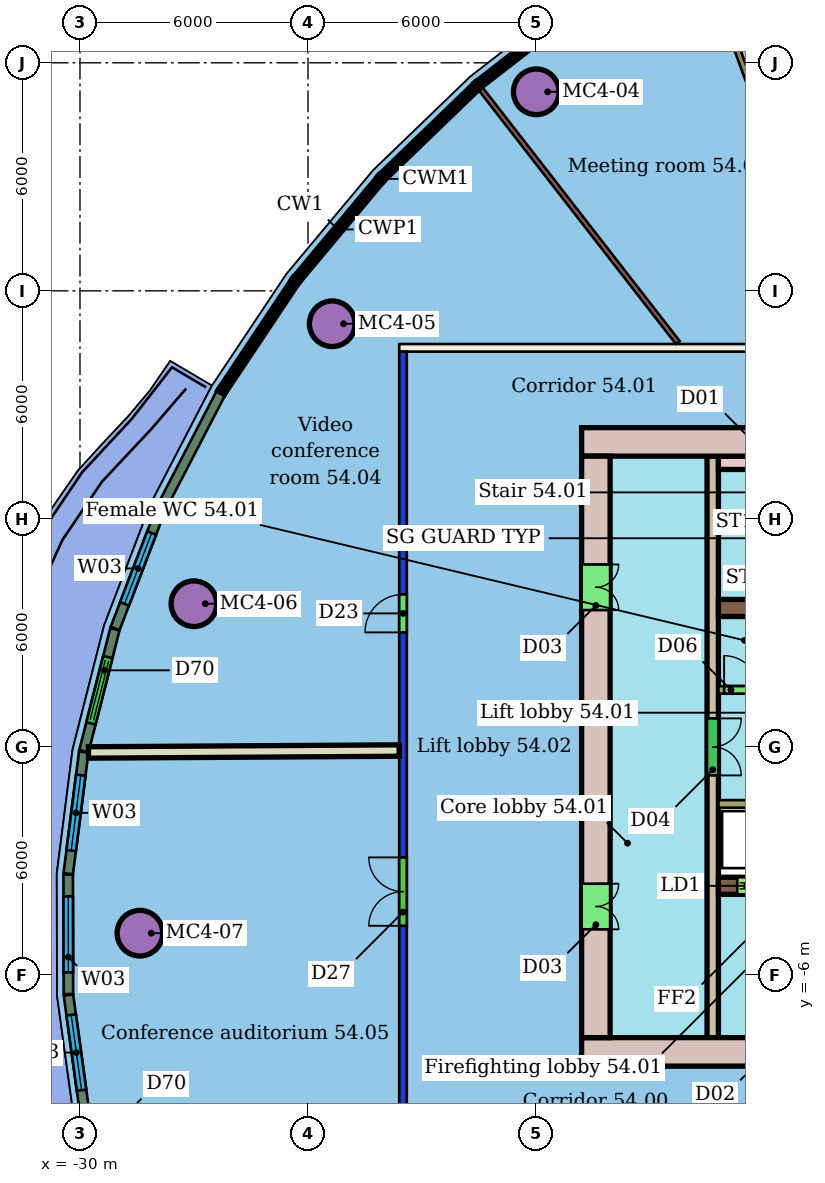
"""IFC4 building model, lengths in metres.
Left out: names, types, materials, properties, quantities, classifications, styles, units other than length and angle.
Written with IfcOpenShell. Run it as: python <this file> out.ifc"""

import sys

from ifc_helpers import new_model, si_unit, direction, frame, frame_2d, origin, origin_2d, place, context, subcontext, project, spatial, rectangle, hollow_circle, extrude, element, fill, save


model = new_model("IFC4")
c1 = context("Model", 3, precision=1e-05, world=origin(), true_north=direction((0.0, 1.0)))
c2 = subcontext(c1, "Body", "Model", "MODEL_VIEW")
j1 = project(units=[si_unit("LENGTHUNIT", "METRE"), si_unit("PLANEANGLEUNIT", "RADIAN")], contexts=[c1])
p1 = place(None, origin())
s1 = spatial("IfcSite", under=j1, at=p1, CompositionType="ELEMENT")
p2 = place(p1, origin())
s2 = spatial("IfcBuilding", under=s1, at=p2, CompositionType="ELEMENT")
p3 = place(p2, frame((0.0, 0.0, 220.9)))
s3 = spatial("IfcBuildingStorey", under=s2, at=p3, CompositionType="ELEMENT", Elevation=220.9)
for number, where, z_axis, x_axis in (
    (1, (-17.993, 17.237, 0.0), (0.0, 0.0, 1.0), (1.0, 0.0, 0.0)),
    (2, (-23.363, 11.134, 0.0), (0.0, 0.0, 1.0), (1.0, 0.0, 0.0)),
    (3, (-27.003, 3.768, 0.0), (0.0, 0.0, 1.0), (1.0, 0.0, 0.0)),
    (4, (-28.424, -4.901, 0.0), (0.0, 0.0, 1.0), (1.0, 0.0, 0.0)),
):
    element("IfcColumn", number, at=place(p3, frame(where, z_axis=z_axis, x_axis=x_axis)), inside=s3, PredefinedType="COLUMN", context=c2, shape_type="SweptSolid", body=[
        extrude(hollow_circle(Radius=0.6, WallThickness=0.045, at=origin_2d()), origin(), (0.0, 0.0, 1.0), 3.45),
    ])
p4 = place(p3, frame((-21.5, -10.4, 0.0), z_axis=(0.0, 0.0, 1.0), x_axis=(0.0, 1.0, 0.0)))
e5 = element("IfcWall", 5, at=p4, inside=s3, PredefinedType="PARTITIONING", context=c2, shape_type="SweptSolid", body=[
    extrude(rectangle(XDim=20.8, YDim=0.2, at=frame_2d((10.4, 0.0))), origin(), (0.0, 0.0, 1.0), 3.05),
])
p5 = place(p4, frame((13.413, 0.0, 0.0)))
e6 = element("IfcOpeningElement", 6, at=p5, cuts=e5, PredefinedType="OPENING", context=c2, shape_type="SweptSolid", body=[
    extrude(rectangle(XDim=1.0, YDim=2.4, at=frame_2d((0.5, 1.2))), frame((0.0, 0.11, 0.0), z_axis=(0.0, -1.0, 0.0), x_axis=(1.0, 0.0, 0.0)), (0.0, 0.0, 1.0), 0.22),
])
p6 = place(p4, frame((5.693, 0.0, 0.0)))
e7 = element("IfcOpeningElement", 7, at=p6, cuts=e5, PredefinedType="OPENING", context=c2, shape_type="SweptSolid", body=[
    extrude(rectangle(XDim=1.8, YDim=2.4, at=frame_2d((0.9, 1.2))), frame((0.0, 0.11, 0.0), z_axis=(0.0, -1.0, 0.0), x_axis=(1.0, 0.0, 0.0)), (0.0, 0.0, 1.0), 0.22),
])
p7 = place(p3, frame((-21.6, 10.5, 0.0), z_axis=(0.0, 0.0, 1.0), x_axis=(1.0, 0.0, 0.0)))
e8 = element("IfcWall", 8, at=p7, inside=s3, PredefinedType="PARTITIONING", context=c2, shape_type="SweptSolid", body=[
    extrude(rectangle(XDim=31.2, YDim=0.2, at=frame_2d((15.6, 0.0))), origin(), (0.0, 0.0, 1.0), 3.45),
])
p8 = place(p7, frame((20.509, 0.0, 0.0)))
e9 = element("IfcOpeningElement", 9, at=p8, cuts=e8, PredefinedType="OPENING", context=c2, shape_type="SweptSolid", body=[
    extrude(rectangle(XDim=1.0, YDim=2.4, at=frame_2d((0.5, 1.2))), frame((0.0, 0.11, 0.0), z_axis=(0.0, -1.0, 0.0), x_axis=(1.0, 0.0, 0.0)), (0.0, 0.0, 1.0), 0.22),
])
p9 = place(p7, frame((13.001, 0.0, 0.0)))
e10 = element("IfcOpeningElement", 10, at=p9, cuts=e8, PredefinedType="OPENING", context=c2, shape_type="SweptSolid", body=[
    extrude(rectangle(XDim=0.9, YDim=2.1, at=frame_2d((0.45, 1.05))), frame((0.0, 0.11, 0.0), z_axis=(0.0, -1.0, 0.0), x_axis=(1.0, 0.0, 0.0)), (0.0, 0.0, 1.0), 0.22),
])
p10 = place(p7, frame((9.617, 0.0, 0.0)))
e11 = element("IfcOpeningElement", 11, at=p10, cuts=e8, PredefinedType="OPENING", context=c2, shape_type="SweptSolid", body=[
    extrude(rectangle(XDim=0.9, YDim=2.1, at=frame_2d((0.45, 1.05))), frame((0.0, 0.11, 0.0), z_axis=(0.0, -1.0, 0.0), x_axis=(1.0, 0.0, 0.0)), (0.0, 0.0, 1.0), 0.22),
])
p11 = place(p7, frame((25.646, 0.0, 0.0)))
e12 = element("IfcOpeningElement", 12, at=p11, cuts=e8, PredefinedType="OPENING", context=c2, shape_type="SweptSolid", body=[
    extrude(rectangle(XDim=1.2, YDim=2.4, at=frame_2d((0.6, 1.2))), frame((0.0, 0.11, 0.0), z_axis=(0.0, -1.0, 0.0), x_axis=(1.0, 0.0, 0.0)), (0.0, 0.0, 1.0), 0.22),
])
p12 = place(p3, frame((-13.765, 21.249, 0.0), z_axis=(0.0, 0.0, 1.0), x_axis=(0.34323140515, -0.939250873046, 0.0)))
e13 = element("IfcWall", 13, at=p12, inside=s3, PredefinedType="PARTITIONING", context=c2, shape_type="SweptSolid", body=[
    extrude(rectangle(XDim=11.31, YDim=0.15, at=frame_2d((5.655, 0.0))), origin(), (0.0, 0.0, 1.0), 3.45),
])
p13 = place(p3, frame((-19.457, 17.314, 0.0), z_axis=(0.0, 0.0, 1.0), x_axis=(0.613674696521, -0.789558969837, 0.0)))
e14 = element("IfcWall", 14, at=p13, inside=s3, PredefinedType="PARTITIONING", context=c2, shape_type="SweptSolid", body=[
    extrude(rectangle(XDim=8.455, YDim=0.125, at=frame_2d((4.228, 0.0))), origin(), (0.0, 0.0, 1.0), 3.45),
])
p14 = place(p3, frame((-29.777, -0.147, 0.0), z_axis=(0.0, 0.0, 1.0), x_axis=(0.999980897338, 0.006181016028, 0.0)))
e15 = element("IfcWall", 15, at=p14, inside=s3, PredefinedType="PARTITIONING", context=c2, shape_type="SweptSolid", body=[
    extrude(rectangle(XDim=8.176, YDim=0.3, at=frame_2d((4.088, 0.0))), origin(), (0.0, 0.0, 1.0), 3.45),
])
p15 = place(p3, frame((-26.294, 9.306, 0.0), z_axis=(0.0, 0.0, 1.0), x_axis=(-0.460432675655, -0.887694627216, 0.0)))
e16 = element("IfcWall", 16, at=p15, inside=s3, PredefinedType="SOLIDWALL", context=c2, shape_type="SweptSolid", body=[
    extrude(rectangle(XDim=3.393, YDim=0.25, at=frame_2d((1.697, 0.0))), origin(), (0.0, 0.0, 1.0), 3.1),
])
p16 = place(p3, frame((-27.866, 6.274, 0.0), z_axis=(0.0, 0.0, 1.0), x_axis=(-0.35762850613, -0.933863936343, 0.0)))
e17 = element("IfcWall", 17, at=p16, inside=s3, PredefinedType="SOLIDWALL", context=c2, shape_type="SweptSolid", body=[
    extrude(rectangle(XDim=3.381, YDim=0.25, at=frame_2d((1.69, 0.0))), origin(), (0.0, 0.0, 1.0), 3.1),
])
p17 = place(p16, frame((0.69, 0.0, 0.9)))
e18 = element("IfcOpeningElement", 18, at=p17, cuts=e17, PredefinedType="OPENING", context=c2, shape_type="SweptSolid", body=[
    extrude(rectangle(XDim=2.0, YDim=2.1, at=frame_2d((1.0, 1.05))), frame((0.0, 0.135, 0.0), z_axis=(0.0, -1.0, 0.0), x_axis=(1.0, 0.0, 0.0)), (0.0, 0.0, 1.0), 0.27),
])
p18 = place(p3, frame((-29.082, 3.096, 0.0), z_axis=(0.0, 0.0, 1.0), x_axis=(-0.246300133035, -0.969193605255, 0.0)))
e19 = element("IfcWall", 19, at=p18, inside=s3, PredefinedType="SOLIDWALL", context=c2, shape_type="SweptSolid", body=[
    extrude(rectangle(XDim=3.31, YDim=0.25, at=frame_2d((1.655, 0.0))), origin(), (0.0, 0.0, 1.0), 3.1),
])
p19 = place(p18, frame((0.755, 0.0, 0.0)))
e20 = element("IfcOpeningElement", 20, at=p19, cuts=e19, PredefinedType="OPENING", context=c2, shape_type="SweptSolid", body=[
    extrude(rectangle(XDim=1.8, YDim=2.4, at=frame_2d((0.9, 1.2))), frame((0.0, 0.135, 0.0), z_axis=(0.0, -1.0, 0.0), x_axis=(1.0, 0.0, 0.0)), (0.0, 0.0, 1.0), 0.27),
])
p20 = place(p3, frame((-29.901, -0.135, 0.0), z_axis=(0.0, 0.0, 1.0), x_axis=(-0.126351687355, -0.991985509522, 0.0)))
e21 = element("IfcWall", 21, at=p20, inside=s3, PredefinedType="SOLIDWALL", context=c2, shape_type="SweptSolid", body=[
    extrude(rectangle(XDim=3.229, YDim=0.25, at=frame_2d((1.614, 0.0))), origin(), (0.0, 0.0, 1.0), 3.1),
])
p21 = place(p20, frame((0.614, 0.0, 0.9)))
e22 = element("IfcOpeningElement", 22, at=p21, cuts=e21, PredefinedType="OPENING", context=c2, shape_type="SweptSolid", body=[
    extrude(rectangle(XDim=2.0, YDim=2.1, at=frame_2d((1.0, 1.05))), frame((0.0, 0.135, 0.0), z_axis=(0.0, -1.0, 0.0), x_axis=(1.0, 0.0, 0.0)), (0.0, 0.0, 1.0), 0.27),
])
p22 = place(p3, frame((-30.31, -3.362, 0.0), z_axis=(0.0, 0.0, 1.0), x_axis=(0.001631445933, -0.999998669191, 0.0)))
e23 = element("IfcWall", 23, at=p22, inside=s3, PredefinedType="SOLIDWALL", context=c2, shape_type="SweptSolid", body=[
    extrude(rectangle(XDim=3.143, YDim=0.25, at=frame_2d((1.571, 0.0))), origin(), (0.0, 0.0, 1.0), 3.1),
])
p23 = place(p22, frame((0.571, 0.0, 0.9)))
e24 = element("IfcOpeningElement", 24, at=p23, cuts=e23, PredefinedType="OPENING", context=c2, shape_type="SweptSolid", body=[
    extrude(rectangle(XDim=2.0, YDim=2.1, at=frame_2d((1.0, 1.05))), frame((0.0, 0.135, 0.0), z_axis=(0.0, -1.0, 0.0), x_axis=(1.0, 0.0, 0.0)), (0.0, 0.0, 1.0), 0.27),
])
p24 = place(p3, frame((-30.303, -6.529, 0.0), z_axis=(0.0, 0.0, 1.0), x_axis=(0.136556327804, -0.99063230784, 0.0)))
e25 = element("IfcWall", 25, at=p24, inside=s3, PredefinedType="SOLIDWALL", context=c2, shape_type="SweptSolid", body=[
    extrude(rectangle(XDim=3.057, YDim=0.25, at=frame_2d((1.529, 0.0))), origin(), (0.0, 0.0, 1.0), 3.1),
])
p25 = place(p24, frame((0.529, 0.0, 0.9)))
e26 = element("IfcOpeningElement", 26, at=p25, cuts=e25, PredefinedType="OPENING", context=c2, shape_type="SweptSolid", body=[
    extrude(rectangle(XDim=2.0, YDim=2.1, at=frame_2d((1.0, 1.05))), frame((0.0, 0.135, 0.0), z_axis=(0.0, -1.0, 0.0), x_axis=(1.0, 0.0, 0.0)), (0.0, 0.0, 1.0), 0.27),
])
p26 = place(p3, frame((-6.0, 8.025, 0.0), z_axis=(0.0, 0.0, 1.0), x_axis=(-1.0, 0.0, 0.0)))
e27 = element("IfcWall", 27, at=p26, inside=s3, PredefinedType="SHEAR", context=c2, shape_type="SweptSolid", body=[
    extrude(rectangle(XDim=10.8, YDim=0.75, at=frame_2d((5.4, 0.0))), origin(), (0.0, 0.0, 1.0), 3.3),
])
p27 = place(p26, frame((5.2, 0.0, 0.0)))
e28 = element("IfcOpeningElement", 28, at=p27, cuts=e27, PredefinedType="OPENING", context=c2, shape_type="SweptSolid", body=[
    extrude(rectangle(XDim=1.2, YDim=2.1, at=frame_2d((0.6, 1.05))), frame((0.0, 0.385, 0.0), z_axis=(0.0, -1.0, 0.0), x_axis=(1.0, 0.0, 0.0)), (0.0, 0.0, 1.0), 0.77),
])
p28 = place(p3, frame((-16.8, -8.025, 0.0), z_axis=(0.0, 0.0, 1.0), x_axis=(1.0, 0.0, 0.0)))
e29 = element("IfcWall", 29, at=p28, inside=s3, PredefinedType="SHEAR", context=c2, shape_type="SweptSolid", body=[
    extrude(rectangle(XDim=21.6, YDim=0.75, at=frame_2d((10.8, 0.0))), origin(), (0.0, 0.0, 1.0), 3.3),
])
p29 = place(p28, frame((4.8, 0.0, 0.0)))
e30 = element("IfcOpeningElement", 30, at=p29, cuts=e29, PredefinedType="OPENING", context=c2, shape_type="SweptSolid", body=[
    extrude(rectangle(XDim=1.2, YDim=2.1, at=frame_2d((0.6, 1.05))), frame((0.0, 0.385, 0.0), z_axis=(0.0, -1.0, 0.0), x_axis=(1.0, 0.0, 0.0)), (0.0, 0.0, 1.0), 0.77),
])
p30 = place(p3, frame((-16.425, 7.65, 0.0), z_axis=(0.0, 0.0, 1.0), x_axis=(0.0, -1.0, 0.0)))
e31 = element("IfcWall", 31, at=p30, inside=s3, PredefinedType="SHEAR", context=c2, shape_type="SweptSolid", body=[
    extrude(rectangle(XDim=15.3, YDim=0.75, at=frame_2d((7.65, 0.0))), origin(), (0.0, 0.0, 1.0), 3.3),
])
p31 = place(p30, frame((11.25, 0.0, 0.0)))
e32 = element("IfcOpeningElement", 32, at=p31, cuts=e31, PredefinedType="OPENING", context=c2, shape_type="SweptSolid", body=[
    extrude(rectangle(XDim=1.2, YDim=2.1, at=frame_2d((0.6, 1.05))), frame((0.0, 0.385, 0.0), z_axis=(0.0, -1.0, 0.0), x_axis=(1.0, 0.0, 0.0)), (0.0, 0.0, 1.0), 0.77),
])
p32 = place(p30, frame((2.85, 0.0, 0.0)))
e33 = element("IfcOpeningElement", 33, at=p32, cuts=e31, PredefinedType="OPENING", context=c2, shape_type="SweptSolid", body=[
    extrude(rectangle(XDim=1.2, YDim=2.1, at=frame_2d((0.6, 1.05))), frame((0.0, 0.385, 0.0), z_axis=(0.0, -1.0, 0.0), x_axis=(1.0, 0.0, 0.0)), (0.0, 0.0, 1.0), 0.77),
])
p33 = place(p3, frame((-13.2, 3.655, 0.0), z_axis=(0.0, 0.0, 1.0), x_axis=(1.0, 0.0, 0.0)))
e34 = element("IfcWall", 34, at=p33, inside=s3, PredefinedType="SHEAR", context=c2, shape_type="SweptSolid", body=[
    extrude(rectangle(XDim=7.2, YDim=0.45, at=frame_2d((3.6, 0.0))), origin(), (0.0, 0.0, 1.0), 3.3),
])
p34 = place(p3, frame((-13.2, -3.655, 0.0), z_axis=(0.0, 0.0, 1.0), x_axis=(1.0, 0.0, 0.0)))
e35 = element("IfcWall", 35, at=p34, inside=s3, PredefinedType="SHEAR", context=c2, shape_type="SweptSolid", body=[
    extrude(rectangle(XDim=7.2, YDim=0.45, at=frame_2d((3.6, 0.0))), origin(), (0.0, 0.0, 1.0), 3.3),
])
p35 = place(p34, frame((0.496, 0.0, 0.0)))
e36 = element("IfcOpeningElement", 36, at=p35, cuts=e35, PredefinedType="OPENING", context=c2, shape_type="SweptSolid", body=[
    extrude(rectangle(XDim=1.2, YDim=2.1, at=frame_2d((0.6, 1.05))), frame((0.0, 0.235, 0.0), z_axis=(0.0, -1.0, 0.0), x_axis=(1.0, 0.0, 0.0)), (0.0, 0.0, 1.0), 0.47),
])
p36 = place(p34, frame((2.938, 0.0, 0.0)))
e37 = element("IfcOpeningElement", 37, at=p36, cuts=e35, PredefinedType="OPENING", context=c2, shape_type="SweptSolid", body=[
    extrude(rectangle(XDim=1.2, YDim=2.1, at=frame_2d((0.6, 1.05))), frame((0.0, 0.235, 0.0), z_axis=(0.0, -1.0, 0.0), x_axis=(1.0, 0.0, 0.0)), (0.0, 0.0, 1.0), 0.47),
])
p37 = place(p3, frame((-13.35, 7.65, 0.0), z_axis=(0.0, 0.0, 1.0), x_axis=(0.0, -1.0, 0.0)))
e38 = element("IfcWall", 38, at=p37, inside=s3, PredefinedType="SHEAR", context=c2, shape_type="SweptSolid", body=[
    extrude(rectangle(XDim=15.3, YDim=0.3, at=frame_2d((7.65, 0.0))), origin(), (0.0, 0.0, 1.0), 3.3),
])
p38 = place(p37, frame((6.9, 0.0, 0.0)))
e39 = element("IfcOpeningElement", 39, at=p38, cuts=e38, PredefinedType="OPENING", context=c2, shape_type="SweptSolid", body=[
    extrude(rectangle(XDim=1.5, YDim=2.1, at=frame_2d((0.75, 1.05))), frame((0.0, 0.16, 0.0), z_axis=(0.0, -1.0, 0.0), x_axis=(1.0, 0.0, 0.0)), (0.0, 0.0, 1.0), 0.32),
])
p39 = place(p3, frame((-13.2, 1.5, 0.0), z_axis=(0.0, 0.0, 1.0), x_axis=(1.0, 0.0, 0.0)))
e40 = element("IfcWall", 40, at=p39, inside=s3, PredefinedType="SHEAR", context=c2, shape_type="SweptSolid", body=[
    extrude(rectangle(XDim=14.4, YDim=0.2, at=frame_2d((7.2, 0.0))), origin(), (0.0, 0.0, 1.0), 3.3),
])
p40 = place(p39, frame((10.312, 0.0, 0.0)))
e41 = element("IfcOpeningElement", 41, at=p40, cuts=e40, PredefinedType="OPENING", context=c2, shape_type="SweptSolid", body=[
    extrude(rectangle(XDim=1.1, YDim=2.1, at=frame_2d((0.55, 1.05))), frame((0.0, 0.11, 0.0), z_axis=(0.0, -1.0, 0.0), x_axis=(1.0, 0.0, 0.0)), (0.0, 0.0, 1.0), 0.22),
])
p41 = place(p39, frame((12.754, 0.0, 0.0)))
e42 = element("IfcOpeningElement", 42, at=p41, cuts=e40, PredefinedType="OPENING", context=c2, shape_type="SweptSolid", body=[
    extrude(rectangle(XDim=1.1, YDim=2.1, at=frame_2d((0.55, 1.05))), frame((0.0, 0.11, 0.0), z_axis=(0.0, -1.0, 0.0), x_axis=(1.0, 0.0, 0.0)), (0.0, 0.0, 1.0), 0.22),
])
p42 = place(p39, frame((0.15, 0.0, 0.0)))
e43 = element("IfcOpeningElement", 43, at=p42, cuts=e40, PredefinedType="OPENING", context=c2, shape_type="SweptSolid", body=[
    extrude(rectangle(XDim=0.9, YDim=2.1, at=frame_2d((0.45, 1.05))), frame((0.0, 0.11, 0.0), z_axis=(0.0, -1.0, 0.0), x_axis=(1.0, 0.0, 0.0)), (0.0, 0.0, 1.0), 0.22),
])
p43 = place(p39, frame((4.222, 0.0, 0.0)))
e44 = element("IfcOpeningElement", 44, at=p43, cuts=e40, PredefinedType="OPENING", context=c2, shape_type="SweptSolid", body=[
    extrude(rectangle(XDim=0.9, YDim=2.1, at=frame_2d((0.45, 1.05))), frame((0.0, 0.11, 0.0), z_axis=(0.0, -1.0, 0.0), x_axis=(1.0, 0.0, 0.0)), (0.0, 0.0, 1.0), 0.22),
])
p44 = place(p39, frame((8.367, 0.0, 0.0)))
e45 = element("IfcOpeningElement", 45, at=p44, cuts=e40, PredefinedType="OPENING", context=c2, shape_type="SweptSolid", body=[
    extrude(rectangle(XDim=1.0, YDim=2.1, at=frame_2d((0.5, 1.05))), frame((0.0, 0.11, 0.0), z_axis=(0.0, -1.0, 0.0), x_axis=(1.0, 0.0, 0.0)), (0.0, 0.0, 1.0), 0.22),
])
p45 = place(p3, frame((1.2, -1.5, 0.0), z_axis=(0.0, 0.0, 1.0), x_axis=(-1.0, 0.0, 0.0)))
e46 = element("IfcWall", 46, at=p45, inside=s3, PredefinedType="SHEAR", context=c2, shape_type="SweptSolid", body=[
    extrude(rectangle(XDim=14.4, YDim=0.2, at=frame_2d((7.2, 0.0))), origin(), (0.0, 0.0, 1.0), 3.3),
])
p46 = place(p45, frame((7.821, 0.0, 0.0)))
e47 = element("IfcOpeningElement", 47, at=p46, cuts=e46, PredefinedType="OPENING", context=c2, shape_type="SweptSolid", body=[
    extrude(rectangle(XDim=1.2, YDim=2.1, at=frame_2d((0.6, 1.05))), frame((0.0, 0.11, 0.0), z_axis=(0.0, -1.0, 0.0), x_axis=(1.0, 0.0, 0.0)), (0.0, 0.0, 1.0), 0.22),
])
p47 = place(p45, frame((0.546, 0.0, 0.0)))
e48 = element("IfcOpeningElement", 48, at=p47, cuts=e46, PredefinedType="OPENING", context=c2, shape_type="SweptSolid", body=[
    extrude(rectangle(XDim=1.1, YDim=2.1, at=frame_2d((0.55, 1.05))), frame((0.0, 0.11, 0.0), z_axis=(0.0, -1.0, 0.0), x_axis=(1.0, 0.0, 0.0)), (0.0, 0.0, 1.0), 0.22),
])
p48 = place(p45, frame((5.632, 0.0, 0.0)))
e49 = element("IfcOpeningElement", 49, at=p48, cuts=e46, PredefinedType="OPENING", context=c2, shape_type="SweptSolid", body=[
    extrude(rectangle(XDim=1.0, YDim=2.1, at=frame_2d((0.5, 1.05))), frame((0.0, 0.11, 0.0), z_axis=(0.0, -1.0, 0.0), x_axis=(1.0, 0.0, 0.0)), (0.0, 0.0, 1.0), 0.22),
])
p49 = place(p45, frame((2.592, 0.0, 0.0)))
e50 = element("IfcOpeningElement", 50, at=p49, cuts=e46, PredefinedType="OPENING", context=c2, shape_type="SweptSolid", body=[
    extrude(rectangle(XDim=1.0, YDim=2.1, at=frame_2d((0.5, 1.05))), frame((0.0, 0.11, 0.0), z_axis=(0.0, -1.0, 0.0), x_axis=(1.0, 0.0, 0.0)), (0.0, 0.0, 1.0), 0.22),
])
p50 = place(p3, frame((-13.2, 7.475, 0.0), z_axis=(0.0, 0.0, 1.0), x_axis=(1.0, 0.0, 0.0)))
e51 = element("IfcWall", 51, at=p50, inside=s3, PredefinedType="SHEAR", context=c2, shape_type="SweptSolid", body=[
    extrude(rectangle(XDim=0.8, YDim=0.35, at=frame_2d((0.4, 0.0))), origin(), (0.0, 0.0, 1.0), 3.3),
])
p51 = place(p5, origin())
e52 = element("IfcDoor", 52, at=p51, inside=s3, OperationType="SINGLE_SWING_LEFT", PredefinedType="DOOR", context=c2, shape_type="SweptSolid", body=[
    extrude(rectangle(XDim=1.0, YDim=2.4, at=frame_2d((0.5, 1.2))), frame((0.0, 0.025, 0.0), z_axis=(0.0, -1.0, 0.0), x_axis=(1.0, 0.0, 0.0)), (0.0, 0.0, 1.0), 0.05),
])
fill(e6, e52)
p52 = place(p6, origin())
e53 = element("IfcDoor", 53, at=p52, inside=s3, OperationType="DOUBLE_DOOR_SINGLE_SWING", PredefinedType="DOOR", context=c2, shape_type="SweptSolid", body=[
    extrude(rectangle(XDim=1.8, YDim=2.4, at=frame_2d((0.9, 1.2))), frame((0.0, 0.025, 0.0), z_axis=(0.0, -1.0, 0.0), x_axis=(1.0, 0.0, 0.0)), (0.0, 0.0, 1.0), 0.05),
])
fill(e7, e53)
p53 = place(p17, origin())
e54 = element("IfcWindow", 54, at=p53, inside=s3, PartitioningType="SINGLE_PANEL", PredefinedType="WINDOW", context=c2, shape_type="SweptSolid", body=[
    extrude(rectangle(XDim=2.0, YDim=2.1, at=frame_2d((1.0, 1.05))), frame((0.0, 0.03, 0.0), z_axis=(0.0, -1.0, 0.0), x_axis=(1.0, 0.0, 0.0)), (0.0, 0.0, 1.0), 0.06),
])
fill(e18, e54)
p54 = place(p19, origin())
e55 = element("IfcDoor", 55, at=p54, inside=s3, OperationType="DOUBLE_DOOR_SLIDING", PredefinedType="DOOR", context=c2, shape_type="SweptSolid", body=[
    extrude(rectangle(XDim=1.8, YDim=2.4, at=frame_2d((0.9, 1.2))), frame((0.0, 0.025, 0.0), z_axis=(0.0, -1.0, 0.0), x_axis=(1.0, 0.0, 0.0)), (0.0, 0.0, 1.0), 0.05),
])
fill(e20, e55)
p55 = place(p21, origin())
e56 = element("IfcWindow", 56, at=p55, inside=s3, PartitioningType="SINGLE_PANEL", PredefinedType="WINDOW", context=c2, shape_type="SweptSolid", body=[
    extrude(rectangle(XDim=2.0, YDim=2.1, at=frame_2d((1.0, 1.05))), frame((0.0, 0.03, 0.0), z_axis=(0.0, -1.0, 0.0), x_axis=(1.0, 0.0, 0.0)), (0.0, 0.0, 1.0), 0.06),
])
fill(e22, e56)
p56 = place(p23, origin())
e57 = element("IfcWindow", 57, at=p56, inside=s3, PartitioningType="SINGLE_PANEL", PredefinedType="WINDOW", context=c2, shape_type="SweptSolid", body=[
    extrude(rectangle(XDim=2.0, YDim=2.1, at=frame_2d((1.0, 1.05))), frame((0.0, 0.03, 0.0), z_axis=(0.0, -1.0, 0.0), x_axis=(1.0, 0.0, 0.0)), (0.0, 0.0, 1.0), 0.06),
])
fill(e24, e57)
p57 = place(p25, origin())
e58 = element("IfcWindow", 58, at=p57, inside=s3, PartitioningType="SINGLE_PANEL", PredefinedType="WINDOW", context=c2, shape_type="SweptSolid", body=[
    extrude(rectangle(XDim=2.0, YDim=2.1, at=frame_2d((1.0, 1.05))), frame((0.0, 0.03, 0.0), z_axis=(0.0, -1.0, 0.0), x_axis=(1.0, 0.0, 0.0)), (0.0, 0.0, 1.0), 0.06),
])
fill(e26, e58)
p58 = place(p31, origin())
e59 = element("IfcDoor", 59, at=p58, inside=s3, OperationType="DOUBLE_DOOR_SINGLE_SWING", PredefinedType="NOTDEFINED", context=c2, shape_type="SweptSolid", body=[
    extrude(rectangle(XDim=1.2, YDim=2.1, at=frame_2d((0.6, 1.05))), frame((0.0, 0.025, 0.0), z_axis=(0.0, -1.0, 0.0), x_axis=(1.0, 0.0, 0.0)), (0.0, 0.0, 1.0), 0.05),
])
fill(e32, e59)
p59 = place(p32, origin())
e60 = element("IfcDoor", 60, at=p59, inside=s3, OperationType="DOUBLE_DOOR_SINGLE_SWING", PredefinedType="NOTDEFINED", context=c2, shape_type="SweptSolid", body=[
    extrude(rectangle(XDim=1.2, YDim=2.1, at=frame_2d((0.6, 1.05))), frame((0.0, 0.025, 0.0), z_axis=(0.0, -1.0, 0.0), x_axis=(1.0, 0.0, 0.0)), (0.0, 0.0, 1.0), 0.05),
])
fill(e33, e60)
p60 = place(p35, origin())
e61 = element("IfcDoor", 61, at=p60, inside=s3, OperationType="DOUBLE_DOOR_SLIDING", PredefinedType="NOTDEFINED", context=c2, shape_type="SweptSolid", body=[
    extrude(rectangle(XDim=1.2, YDim=2.1, at=frame_2d((0.6, 1.05))), frame((0.0, 0.025, 0.0), z_axis=(0.0, -1.0, 0.0), x_axis=(1.0, 0.0, 0.0)), (0.0, 0.0, 1.0), 0.05),
])
fill(e36, e61)
p61 = place(p38, origin())
e62 = element("IfcDoor", 62, at=p61, inside=s3, OperationType="DOUBLE_DOOR_SINGLE_SWING", PredefinedType="NOTDEFINED", context=c2, shape_type="SweptSolid", body=[
    extrude(rectangle(XDim=1.5, YDim=2.1, at=frame_2d((0.75, 1.05))), frame((0.0, 0.025, 0.0), z_axis=(0.0, -1.0, 0.0), x_axis=(1.0, 0.0, 0.0)), (0.0, 0.0, 1.0), 0.05),
])
fill(e39, e62)
p62 = place(p42, origin())
e63 = element("IfcDoor", 63, at=p62, inside=s3, OperationType="SINGLE_SWING_LEFT", PredefinedType="NOTDEFINED", context=c2, shape_type="SweptSolid", body=[
    extrude(rectangle(XDim=0.9, YDim=2.1, at=frame_2d((0.45, 1.05))), frame((0.0, 0.025, 0.0), z_axis=(0.0, -1.0, 0.0), x_axis=(1.0, 0.0, 0.0)), (0.0, 0.0, 1.0), 0.05),
])
fill(e43, e63)
save(model, sys.argv[1])
